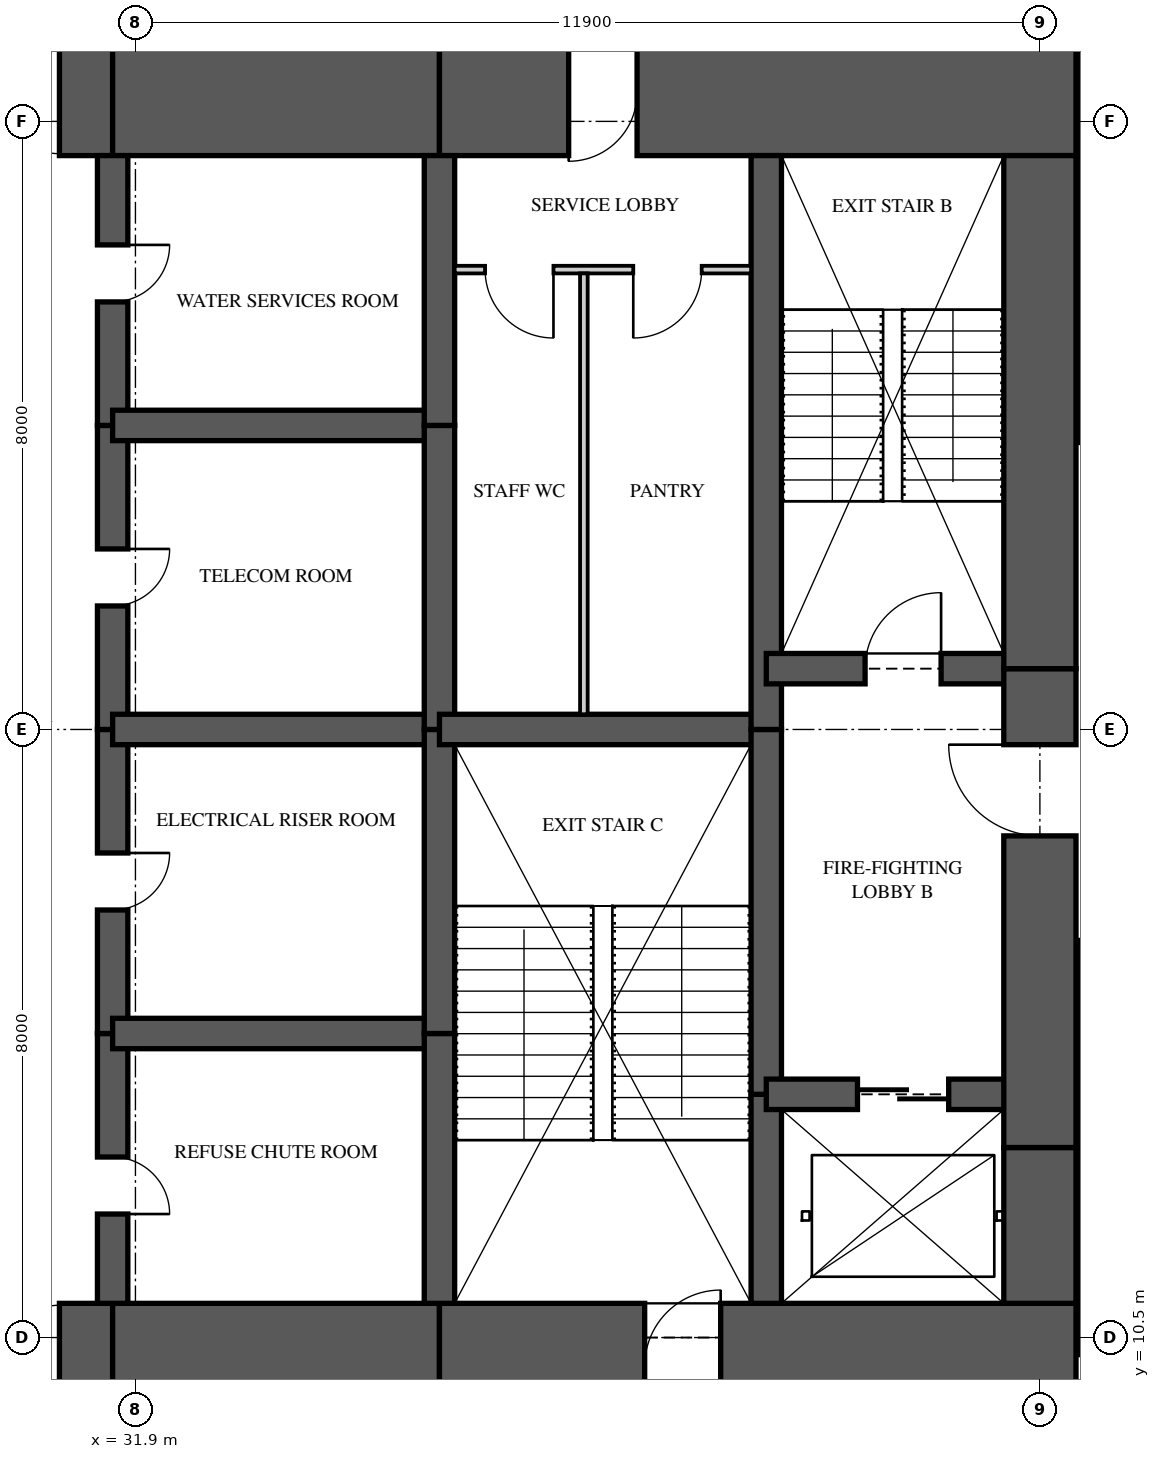
"""IFC4 building model, lengths in metres.
Left out: names, types, materials, properties, quantities, classifications, styles, units other than length and angle.
Written with IfcOpenShell. Run it as: python <this file> out.ifc"""

import sys

from ifc_helpers import new_model, si_unit, direction, frame, frame_2d, origin, place, context, subcontext, project, spatial, rectangle, extrude, element, fill, save


model = new_model("IFC4")
c1 = context("Model", 3, precision=1e-05, world=origin(), true_north=direction((0.0, 1.0)))
c2 = subcontext(c1, "Body", "Model", "MODEL_VIEW")
j1 = project(units=[si_unit("LENGTHUNIT", "METRE"), si_unit("PLANEANGLEUNIT", "RADIAN")], contexts=[c1])
p1 = place(None, origin())
s1 = spatial("IfcSite", under=j1, at=p1, CompositionType="ELEMENT")
p2 = place(p1, origin())
s2 = spatial("IfcBuilding", under=s1, at=p2, CompositionType="ELEMENT")
p3 = place(p2, frame((0.0, 0.0, 24.35)))
s3 = spatial("IfcBuildingStorey", under=s2, at=p3, CompositionType="ELEMENT", Elevation=24.35)
p4 = place(p3, frame((26.0, 10.125, 0.0), z_axis=(0.0, 0.0, 1.0), x_axis=(1.0, 0.0, 0.0)))
e1 = element("IfcWall", 1, at=p4, inside=s3, PredefinedType="SHEAR", context=c2, shape_type="SweptSolid", body=[
    extrude(rectangle(XDim=5.6, YDim=1.65, at=frame_2d((2.8, 0.0))), origin(), (0.0, 0.0, 1.0), 3.35),
])
p5 = place(p4, frame((3.3, 0.0, 0.0)))
e2 = element("IfcOpeningElement", 2, at=p5, cuts=e1, PredefinedType="OPENING", context=c2, shape_type="SweptSolid", body=[
    extrude(rectangle(XDim=1.6, YDim=2.1, at=frame_2d((0.8, 1.05))), frame((0.0, 0.835, 0.0), z_axis=(0.0, -1.0, 0.0), x_axis=(1.0, 0.0, 0.0)), (0.0, 0.0, 1.0), 1.67),
])
p6 = place(p3, frame((31.6, 10.125, 0.0), z_axis=(0.0, 0.0, 1.0), x_axis=(1.0, 0.0, 0.0)))
e3 = element("IfcWall", 3, at=p6, inside=s3, PredefinedType="SHEAR", context=c2, shape_type="SweptSolid", body=[
    extrude(rectangle(XDim=4.3, YDim=1.65, at=frame_2d((2.15, 0.0))), origin(), (0.0, 0.0, 1.0), 3.35),
])
p7 = place(p3, frame((35.9, 10.125, 0.0), z_axis=(0.0, 0.0, 1.0), x_axis=(1.0, 0.0, 0.0)))
e4 = element("IfcWall", 4, at=p7, inside=s3, PredefinedType="SHEAR", context=c2, shape_type="SweptSolid", body=[
    extrude(rectangle(XDim=8.375, YDim=1.65, at=frame_2d((4.188, 0.0))), origin(), (0.0, 0.0, 1.0), 3.35),
])
p8 = place(p7, frame((2.7, 0.0, 0.0)))
e5 = element("IfcOpeningElement", 5, at=p8, cuts=e4, PredefinedType="OPENING", context=c2, shape_type="SweptSolid", body=[
    extrude(rectangle(XDim=1.0, YDim=2.1, at=frame_2d((0.5, 1.05))), frame((0.0, 0.835, 0.0), z_axis=(0.0, -1.0, 0.0), x_axis=(1.0, 0.0, 0.0)), (0.0, 0.0, 1.0), 1.67),
])
p9 = place(p3, frame((44.275, 26.875, 0.0), z_axis=(0.0, 0.0, 1.0), x_axis=(-1.0, 0.0, 0.0)))
e6 = element("IfcWall", 6, at=p9, inside=s3, PredefinedType="SHEAR", context=c2, shape_type="SweptSolid", body=[
    extrude(rectangle(XDim=8.375, YDim=1.65, at=frame_2d((4.188, 0.0))), origin(), (0.0, 0.0, 1.0), 3.35),
])
p10 = place(p9, frame((5.775, 0.0, 0.0)))
e7 = element("IfcOpeningElement", 7, at=p10, cuts=e6, PredefinedType="OPENING", context=c2, shape_type="SweptSolid", body=[
    extrude(rectangle(XDim=0.9, YDim=2.1, at=frame_2d((0.45, 1.05))), frame((0.0, 0.835, 0.0), z_axis=(0.0, -1.0, 0.0), x_axis=(1.0, 0.0, 0.0)), (0.0, 0.0, 1.0), 1.67),
])
p11 = place(p3, frame((35.9, 26.875, 0.0), z_axis=(0.0, 0.0, 1.0), x_axis=(-1.0, 0.0, 0.0)))
e8 = element("IfcWall", 8, at=p11, inside=s3, PredefinedType="SHEAR", context=c2, shape_type="SweptSolid", body=[
    extrude(rectangle(XDim=4.3, YDim=1.65, at=frame_2d((2.15, 0.0))), origin(), (0.0, 0.0, 1.0), 3.35),
])
p12 = place(p3, frame((31.6, 26.875, 0.0), z_axis=(0.0, 0.0, 1.0), x_axis=(-1.0, 0.0, 0.0)))
e9 = element("IfcWall", 9, at=p12, inside=s3, PredefinedType="SHEAR", context=c2, shape_type="SweptSolid", body=[
    extrude(rectangle(XDim=5.6, YDim=1.65, at=frame_2d((2.8, 0.0))), origin(), (0.0, 0.0, 1.0), 3.35),
])
p13 = place(p12, frame((0.7, 0.0, 0.0)))
e10 = element("IfcOpeningElement", 10, at=p13, cuts=e9, PredefinedType="OPENING", context=c2, shape_type="SweptSolid", body=[
    extrude(rectangle(XDim=1.6, YDim=2.1, at=frame_2d((0.8, 1.05))), frame((0.0, 0.835, 0.0), z_axis=(0.0, -1.0, 0.0), x_axis=(1.0, 0.0, 0.0)), (0.0, 0.0, 1.0), 1.67),
])
p14 = place(p3, frame((43.8, 10.95, 0.0), z_axis=(0.0, 0.0, 1.0), x_axis=(0.0, 1.0, 0.0)))
e11 = element("IfcWall", 11, at=p14, inside=s3, PredefinedType="SHEAR", context=c2, shape_type="SweptSolid", body=[
    extrude(rectangle(XDim=2.05, YDim=0.95, at=frame_2d((1.025, 0.0))), origin(), (0.0, 0.0, 1.0), 3.35),
])
p15 = place(p3, frame((43.8, 13.0, 0.0), z_axis=(0.0, 0.0, 1.0), x_axis=(0.0, 1.0, 0.0)))
e12 = element("IfcWall", 12, at=p15, inside=s3, PredefinedType="SHEAR", context=c2, shape_type="SweptSolid", body=[
    extrude(rectangle(XDim=6.3, YDim=0.95, at=frame_2d((3.15, 0.0))), origin(), (0.0, 0.0, 1.0), 3.35),
])
p16 = place(p15, frame((4.1, 0.0, 0.0)))
e13 = element("IfcOpeningElement", 13, at=p16, cuts=e12, PredefinedType="OPENING", context=c2, shape_type="SweptSolid", body=[
    extrude(rectangle(XDim=1.2, YDim=2.2, at=frame_2d((0.6, 1.1))), frame((0.0, 0.485, 0.0), z_axis=(0.0, -1.0, 0.0), x_axis=(1.0, 0.0, 0.0)), (0.0, 0.0, 1.0), 0.97),
])
p17 = place(p3, frame((43.8, 19.3, 0.0), z_axis=(0.0, 0.0, 1.0), x_axis=(0.0, 1.0, 0.0)))
e14 = element("IfcWall", 14, at=p17, inside=s3, PredefinedType="SHEAR", context=c2, shape_type="SweptSolid", body=[
    extrude(rectangle(XDim=6.75, YDim=0.95, at=frame_2d((3.375, 0.0))), origin(), (0.0, 0.0, 1.0), 3.35),
])
p18 = place(p3, frame((31.6, 10.95, 0.0), z_axis=(0.0, 0.0, 1.0), x_axis=(0.0, 1.0, 0.0)))
e15 = element("IfcWall", 15, at=p18, inside=s3, PredefinedType="SHEAR", context=c2, shape_type="SweptSolid", body=[
    extrude(rectangle(XDim=3.55, YDim=0.4, at=frame_2d((1.775, 0.0))), origin(), (0.0, 0.0, 1.0), 3.35),
])
p19 = place(p18, frame((1.175, 0.0, 0.0)))
e16 = element("IfcOpeningElement", 16, at=p19, cuts=e15, PredefinedType="OPENING", context=c2, shape_type="SweptSolid", body=[
    extrude(rectangle(XDim=0.75, YDim=2.1, at=frame_2d((0.375, 1.05))), frame((0.0, 0.21, 0.0), z_axis=(0.0, -1.0, 0.0), x_axis=(1.0, 0.0, 0.0)), (0.0, 0.0, 1.0), 0.42),
])
p20 = place(p3, frame((31.6, 14.5, 0.0), z_axis=(0.0, 0.0, 1.0), x_axis=(0.0, 1.0, 0.0)))
e17 = element("IfcWall", 17, at=p20, inside=s3, PredefinedType="SHEAR", context=c2, shape_type="SweptSolid", body=[
    extrude(rectangle(XDim=4.0, YDim=0.4, at=frame_2d((2.0, 0.0))), origin(), (0.0, 0.0, 1.0), 3.35),
])
p21 = place(p20, frame((1.625, 0.0, 0.0)))
e18 = element("IfcOpeningElement", 18, at=p21, cuts=e17, PredefinedType="OPENING", context=c2, shape_type="SweptSolid", body=[
    extrude(rectangle(XDim=0.75, YDim=2.1, at=frame_2d((0.375, 1.05))), frame((0.0, 0.21, 0.0), z_axis=(0.0, -1.0, 0.0), x_axis=(1.0, 0.0, 0.0)), (0.0, 0.0, 1.0), 0.42),
])
p22 = place(p3, frame((31.6, 18.5, 0.0), z_axis=(0.0, 0.0, 1.0), x_axis=(0.0, 1.0, 0.0)))
e19 = element("IfcWall", 19, at=p22, inside=s3, PredefinedType="SHEAR", context=c2, shape_type="SweptSolid", body=[
    extrude(rectangle(XDim=4.0, YDim=0.4, at=frame_2d((2.0, 0.0))), origin(), (0.0, 0.0, 1.0), 3.35),
])
p23 = place(p22, frame((1.625, 0.0, 0.0)))
e20 = element("IfcOpeningElement", 20, at=p23, cuts=e19, PredefinedType="OPENING", context=c2, shape_type="SweptSolid", body=[
    extrude(rectangle(XDim=0.75, YDim=2.1, at=frame_2d((0.375, 1.05))), frame((0.0, 0.21, 0.0), z_axis=(0.0, -1.0, 0.0), x_axis=(1.0, 0.0, 0.0)), (0.0, 0.0, 1.0), 0.42),
])
p24 = place(p3, frame((31.6, 22.5, 0.0), z_axis=(0.0, 0.0, 1.0), x_axis=(0.0, 1.0, 0.0)))
e21 = element("IfcWall", 21, at=p24, inside=s3, PredefinedType="SHEAR", context=c2, shape_type="SweptSolid", body=[
    extrude(rectangle(XDim=3.55, YDim=0.4, at=frame_2d((1.775, 0.0))), origin(), (0.0, 0.0, 1.0), 3.35),
])
p25 = place(p24, frame((1.625, 0.0, 0.0)))
e22 = element("IfcOpeningElement", 22, at=p25, cuts=e21, PredefinedType="OPENING", context=c2, shape_type="SweptSolid", body=[
    extrude(rectangle(XDim=0.75, YDim=2.1, at=frame_2d((0.375, 1.05))), frame((0.0, 0.21, 0.0), z_axis=(0.0, -1.0, 0.0), x_axis=(1.0, 0.0, 0.0)), (0.0, 0.0, 1.0), 0.42),
])
p26 = place(p3, frame((35.9, 10.95, 0.0), z_axis=(0.0, 0.0, 1.0), x_axis=(0.0, 1.0, 0.0)))
e23 = element("IfcWall", 23, at=p26, inside=s3, PredefinedType="SHEAR", context=c2, shape_type="SweptSolid", body=[
    extrude(rectangle(XDim=3.55, YDim=0.4, at=frame_2d((1.775, 0.0))), origin(), (0.0, 0.0, 1.0), 3.35),
])
for number, where, z_axis, x_axis in (
    (24, (35.9, 14.5, 0.0), (0.0, 0.0, 1.0), (0.0, 1.0, 0.0)),
    (25, (35.9, 18.5, 0.0), (0.0, 0.0, 1.0), (0.0, 1.0, 0.0)),
):
    element("IfcWall", number, at=place(p3, frame(where, z_axis=z_axis, x_axis=x_axis)), inside=s3, PredefinedType="SHEAR", context=c2, shape_type="SweptSolid", body=[
        extrude(rectangle(XDim=4.0, YDim=0.4, at=frame_2d((2.0, 0.0))), origin(), (0.0, 0.0, 1.0), 3.35),
    ])
p27 = place(p3, frame((35.9, 22.5, 0.0), z_axis=(0.0, 0.0, 1.0), x_axis=(0.0, 1.0, 0.0)))
e26 = element("IfcWall", 26, at=p27, inside=s3, PredefinedType="SHEAR", context=c2, shape_type="SweptSolid", body=[
    extrude(rectangle(XDim=3.55, YDim=0.4, at=frame_2d((1.775, 0.0))), origin(), (0.0, 0.0, 1.0), 3.35),
])
p28 = place(p3, frame((40.2, 10.95, 0.0), z_axis=(0.0, 0.0, 1.0), x_axis=(0.0, 1.0, 0.0)))
e27 = element("IfcWall", 27, at=p28, inside=s3, PredefinedType="SHEAR", context=c2, shape_type="SweptSolid", body=[
    extrude(rectangle(XDim=2.75, YDim=0.4, at=frame_2d((1.375, 0.0))), origin(), (0.0, 0.0, 1.0), 3.35),
])
p29 = place(p3, frame((40.2, 13.7, 0.0), z_axis=(0.0, 0.0, 1.0), x_axis=(0.0, 1.0, 0.0)))
e28 = element("IfcWall", 28, at=p29, inside=s3, PredefinedType="SHEAR", context=c2, shape_type="SweptSolid", body=[
    extrude(rectangle(XDim=4.8, YDim=0.4, at=frame_2d((2.4, 0.0))), origin(), (0.0, 0.0, 1.0), 3.35),
])
p30 = place(p3, frame((40.2, 18.5, 0.0), z_axis=(0.0, 0.0, 1.0), x_axis=(0.0, 1.0, 0.0)))
e29 = element("IfcWall", 29, at=p30, inside=s3, PredefinedType="SHEAR", context=c2, shape_type="SweptSolid", body=[
    extrude(rectangle(XDim=7.55, YDim=0.4, at=frame_2d((3.775, 0.0))), origin(), (0.0, 0.0, 1.0), 3.35),
])
for number, where, z_axis, x_axis in (
    (30, (31.6, 14.5, 0.0), (0.0, 0.0, 1.0), (1.0, 0.0, 0.0)),
    (31, (31.6, 18.5, 0.0), (0.0, 0.0, 1.0), (1.0, 0.0, 0.0)),
    (32, (31.6, 22.5, 0.0), (0.0, 0.0, 1.0), (1.0, 0.0, 0.0)),
):
    element("IfcWall", number, at=place(p3, frame(where, z_axis=z_axis, x_axis=x_axis)), inside=s3, PredefinedType="SHEAR", context=c2, shape_type="SweptSolid", body=[
        extrude(rectangle(XDim=4.3, YDim=0.4, at=frame_2d((2.15, 0.0))), origin(), (0.0, 0.0, 1.0), 3.35),
    ])
p31 = place(p3, frame((35.9, 18.5, 0.0), z_axis=(0.0, 0.0, 1.0), x_axis=(1.0, 0.0, 0.0)))
e33 = element("IfcWall", 33, at=p31, inside=s3, PredefinedType="SHEAR", context=c2, shape_type="SweptSolid", body=[
    extrude(rectangle(XDim=4.3, YDim=0.4, at=frame_2d((2.15, 0.0))), origin(), (0.0, 0.0, 1.0), 3.35),
])
p32 = place(p3, frame((40.2, 13.7, 0.0), z_axis=(0.0, 0.0, 1.0), x_axis=(1.0, 0.0, 0.0)))
e34 = element("IfcWall", 34, at=p32, inside=s3, PredefinedType="SHEAR", context=c2, shape_type="SweptSolid", body=[
    extrude(rectangle(XDim=3.6, YDim=0.4, at=frame_2d((1.8, 0.0))), origin(), (0.0, 0.0, 1.0), 3.35),
])
p33 = place(p32, frame((1.2, 0.0, 0.0)))
e35 = element("IfcOpeningElement", 35, at=p33, cuts=e34, PredefinedType="OPENING", context=c2, shape_type="SweptSolid", body=[
    extrude(rectangle(XDim=1.2, YDim=2.1, at=frame_2d((0.6, 1.05))), frame((0.0, 0.21, 0.0), z_axis=(0.0, -1.0, 0.0), x_axis=(1.0, 0.0, 0.0)), (0.0, 0.0, 1.0), 0.42),
])
p34 = place(p3, frame((40.2, 19.3, 0.0), z_axis=(0.0, 0.0, 1.0), x_axis=(1.0, 0.0, 0.0)))
e36 = element("IfcWall", 36, at=p34, inside=s3, PredefinedType="SHEAR", context=c2, shape_type="SweptSolid", body=[
    extrude(rectangle(XDim=3.6, YDim=0.4, at=frame_2d((1.8, 0.0))), origin(), (0.0, 0.0, 1.0), 3.35),
])
p35 = place(p34, frame((1.3, 0.0, 0.0)))
e37 = element("IfcOpeningElement", 37, at=p35, cuts=e36, PredefinedType="OPENING", context=c2, shape_type="SweptSolid", body=[
    extrude(rectangle(XDim=1.0, YDim=2.1, at=frame_2d((0.5, 1.05))), frame((0.0, 0.21, 0.0), z_axis=(0.0, -1.0, 0.0), x_axis=(1.0, 0.0, 0.0)), (0.0, 0.0, 1.0), 0.42),
])
p36 = place(p3, frame((36.1, 24.55, 0.0), z_axis=(0.0, 0.0, 1.0), x_axis=(1.0, 0.0, 0.0)))
e38 = element("IfcWall", 38, at=p36, inside=s3, PredefinedType="PARTITIONING", context=c2, shape_type="SweptSolid", body=[
    extrude(rectangle(XDim=3.9, YDim=0.1, at=frame_2d((1.95, 0.0))), origin(), (0.0, 0.0, 1.0), 3.11),
])
p37 = place(p36, frame((0.4, 0.0, 0.0)))
e39 = element("IfcOpeningElement", 39, at=p37, cuts=e38, PredefinedType="OPENING", context=c2, shape_type="SweptSolid", body=[
    extrude(rectangle(XDim=0.9, YDim=2.1, at=frame_2d((0.45, 1.05))), frame((0.0, 0.06, 0.0), z_axis=(0.0, -1.0, 0.0), x_axis=(1.0, 0.0, 0.0)), (0.0, 0.0, 1.0), 0.12),
])
p38 = place(p36, frame((2.35, 0.0, 0.0)))
e40 = element("IfcOpeningElement", 40, at=p38, cuts=e38, PredefinedType="OPENING", context=c2, shape_type="SweptSolid", body=[
    extrude(rectangle(XDim=0.9, YDim=2.1, at=frame_2d((0.45, 1.05))), frame((0.0, 0.06, 0.0), z_axis=(0.0, -1.0, 0.0), x_axis=(1.0, 0.0, 0.0)), (0.0, 0.0, 1.0), 0.12),
])
p39 = place(p3, frame((37.8, 18.7, 0.0), z_axis=(0.0, 0.0, 1.0), x_axis=(0.0, 1.0, 0.0)))
e41 = element("IfcWall", 41, at=p39, inside=s3, PredefinedType="PARTITIONING", context=c2, shape_type="SweptSolid", body=[
    extrude(rectangle(XDim=5.8, YDim=0.1, at=frame_2d((2.9, 0.0))), origin(), (0.0, 0.0, 1.0), 3.11),
])
p40 = place(p37, frame((0.9, 0.0, 0.0), z_axis=(0.0, 0.0, 1.0), x_axis=(-1.0, 0.0, 0.0)))
e42 = element("IfcDoor", 42, at=p40, inside=s3, OperationType="SINGLE_SWING_LEFT", PredefinedType="DOOR", context=c2, shape_type="SweptSolid", body=[
    extrude(rectangle(XDim=0.9, YDim=2.1, at=frame_2d((0.45, 1.05))), frame((0.0, 0.025, 0.0), z_axis=(0.0, -1.0, 0.0), x_axis=(1.0, 0.0, 0.0)), (0.0, 0.0, 1.0), 0.05),
])
fill(e39, e42)
p41 = place(p38, frame((0.9, 0.0, 0.0), z_axis=(0.0, 0.0, 1.0), x_axis=(-1.0, 0.0, 0.0)))
e43 = element("IfcDoor", 43, at=p41, inside=s3, OperationType="SINGLE_SWING_RIGHT", PredefinedType="DOOR", context=c2, shape_type="SweptSolid", body=[
    extrude(rectangle(XDim=0.9, YDim=2.1, at=frame_2d((0.45, 1.05))), frame((0.0, 0.025, 0.0), z_axis=(0.0, -1.0, 0.0), x_axis=(1.0, 0.0, 0.0)), (0.0, 0.0, 1.0), 0.05),
])
fill(e40, e43)
p42 = place(p35, origin())
e44 = element("IfcDoor", 44, at=p42, inside=s3, OperationType="SINGLE_SWING_RIGHT", PredefinedType="DOOR", context=c2, shape_type="SweptSolid", body=[
    extrude(rectangle(XDim=1.0, YDim=2.1, at=frame_2d((0.5, 1.05))), frame((0.0, 0.025, 0.0), z_axis=(0.0, -1.0, 0.0), x_axis=(1.0, 0.0, 0.0)), (0.0, 0.0, 1.0), 0.05),
])
fill(e37, e44)
p43 = place(p16, origin())
e45 = element("IfcDoor", 45, at=p43, inside=s3, OperationType="SINGLE_SWING_RIGHT", PredefinedType="DOOR", context=c2, shape_type="SweptSolid", body=[
    extrude(rectangle(XDim=1.2, YDim=2.2, at=frame_2d((0.6, 1.1))), frame((0.0, 0.025, 0.0), z_axis=(0.0, -1.0, 0.0), x_axis=(1.0, 0.0, 0.0)), (0.0, 0.0, 1.0), 0.05),
])
fill(e13, e45)
p44 = place(p33, origin())
e46 = element("IfcDoor", 46, at=p44, inside=s3, OperationType="SLIDING_TO_LEFT", PredefinedType="DOOR", context=c2, shape_type="SweptSolid", body=[
    extrude(rectangle(XDim=1.2, YDim=2.1, at=frame_2d((0.6, 1.05))), frame((0.0, 0.025, 0.0), z_axis=(0.0, -1.0, 0.0), x_axis=(1.0, 0.0, 0.0)), (0.0, 0.0, 1.0), 0.05),
])
fill(e35, e46)
p45 = place(p5, origin())
e47 = element("IfcDoor", 47, at=p45, inside=s3, OperationType="DOUBLE_DOOR_SINGLE_SWING", PredefinedType="DOOR", context=c2, shape_type="SweptSolid", body=[
    extrude(rectangle(XDim=1.6, YDim=2.1, at=frame_2d((0.8, 1.05))), frame((0.0, 0.025, 0.0), z_axis=(0.0, -1.0, 0.0), x_axis=(1.0, 0.0, 0.0)), (0.0, 0.0, 1.0), 0.05),
])
fill(e2, e47)
p46 = place(p13, origin())
e48 = element("IfcDoor", 48, at=p46, inside=s3, OperationType="DOUBLE_DOOR_SINGLE_SWING", PredefinedType="DOOR", context=c2, shape_type="SweptSolid", body=[
    extrude(rectangle(XDim=1.6, YDim=2.1, at=frame_2d((0.8, 1.05))), frame((0.0, 0.025, 0.0), z_axis=(0.0, -1.0, 0.0), x_axis=(1.0, 0.0, 0.0)), (0.0, 0.0, 1.0), 0.05),
])
fill(e10, e48)
p47 = place(p19, frame((0.75, 0.0, 0.0), z_axis=(0.0, 0.0, 1.0), x_axis=(-1.0, 0.0, 0.0)))
e49 = element("IfcDoor", 49, at=p47, inside=s3, OperationType="SINGLE_SWING_RIGHT", PredefinedType="DOOR", context=c2, shape_type="SweptSolid", body=[
    extrude(rectangle(XDim=0.75, YDim=2.1, at=frame_2d((0.375, 1.05))), frame((0.0, 0.025, 0.0), z_axis=(0.0, -1.0, 0.0), x_axis=(1.0, 0.0, 0.0)), (0.0, 0.0, 1.0), 0.05),
])
fill(e16, e49)
p48 = place(p21, frame((0.75, 0.0, 0.0), z_axis=(0.0, 0.0, 1.0), x_axis=(-1.0, 0.0, 0.0)))
e50 = element("IfcDoor", 50, at=p48, inside=s3, OperationType="SINGLE_SWING_LEFT", PredefinedType="DOOR", context=c2, shape_type="SweptSolid", body=[
    extrude(rectangle(XDim=0.75, YDim=2.1, at=frame_2d((0.375, 1.05))), frame((0.0, 0.025, 0.0), z_axis=(0.0, -1.0, 0.0), x_axis=(1.0, 0.0, 0.0)), (0.0, 0.0, 1.0), 0.05),
])
fill(e18, e50)
p49 = place(p23, frame((0.75, 0.0, 0.0), z_axis=(0.0, 0.0, 1.0), x_axis=(-1.0, 0.0, 0.0)))
e51 = element("IfcDoor", 51, at=p49, inside=s3, OperationType="SINGLE_SWING_LEFT", PredefinedType="DOOR", context=c2, shape_type="SweptSolid", body=[
    extrude(rectangle(XDim=0.75, YDim=2.1, at=frame_2d((0.375, 1.05))), frame((0.0, 0.025, 0.0), z_axis=(0.0, -1.0, 0.0), x_axis=(1.0, 0.0, 0.0)), (0.0, 0.0, 1.0), 0.05),
])
fill(e20, e51)
p50 = place(p25, frame((0.75, 0.0, 0.0), z_axis=(0.0, 0.0, 1.0), x_axis=(-1.0, 0.0, 0.0)))
e52 = element("IfcDoor", 52, at=p50, inside=s3, OperationType="SINGLE_SWING_LEFT", PredefinedType="DOOR", context=c2, shape_type="SweptSolid", body=[
    extrude(rectangle(XDim=0.75, YDim=2.1, at=frame_2d((0.375, 1.05))), frame((0.0, 0.025, 0.0), z_axis=(0.0, -1.0, 0.0), x_axis=(1.0, 0.0, 0.0)), (0.0, 0.0, 1.0), 0.05),
])
fill(e22, e52)
p51 = place(p8, origin())
e53 = element("IfcDoor", 53, at=p51, inside=s3, OperationType="SINGLE_SWING_RIGHT", PredefinedType="DOOR", context=c2, shape_type="SweptSolid", body=[
    extrude(rectangle(XDim=1.0, YDim=2.1, at=frame_2d((0.5, 1.05))), frame((0.0, 0.025, 0.0), z_axis=(0.0, -1.0, 0.0), x_axis=(1.0, 0.0, 0.0)), (0.0, 0.0, 1.0), 0.05),
])
fill(e5, e53)
p52 = place(p10, origin())
e54 = element("IfcDoor", 54, at=p52, inside=s3, OperationType="SINGLE_SWING_RIGHT", PredefinedType="DOOR", context=c2, shape_type="SweptSolid", body=[
    extrude(rectangle(XDim=0.9, YDim=2.1, at=frame_2d((0.45, 1.05))), frame((0.0, 0.47, 0.0), z_axis=(0.0, -1.0, 0.0), x_axis=(1.0, 0.0, 0.0)), (0.0, 0.0, 1.0), 0.8),
])
fill(e7, e54)
save(model, sys.argv[1])
